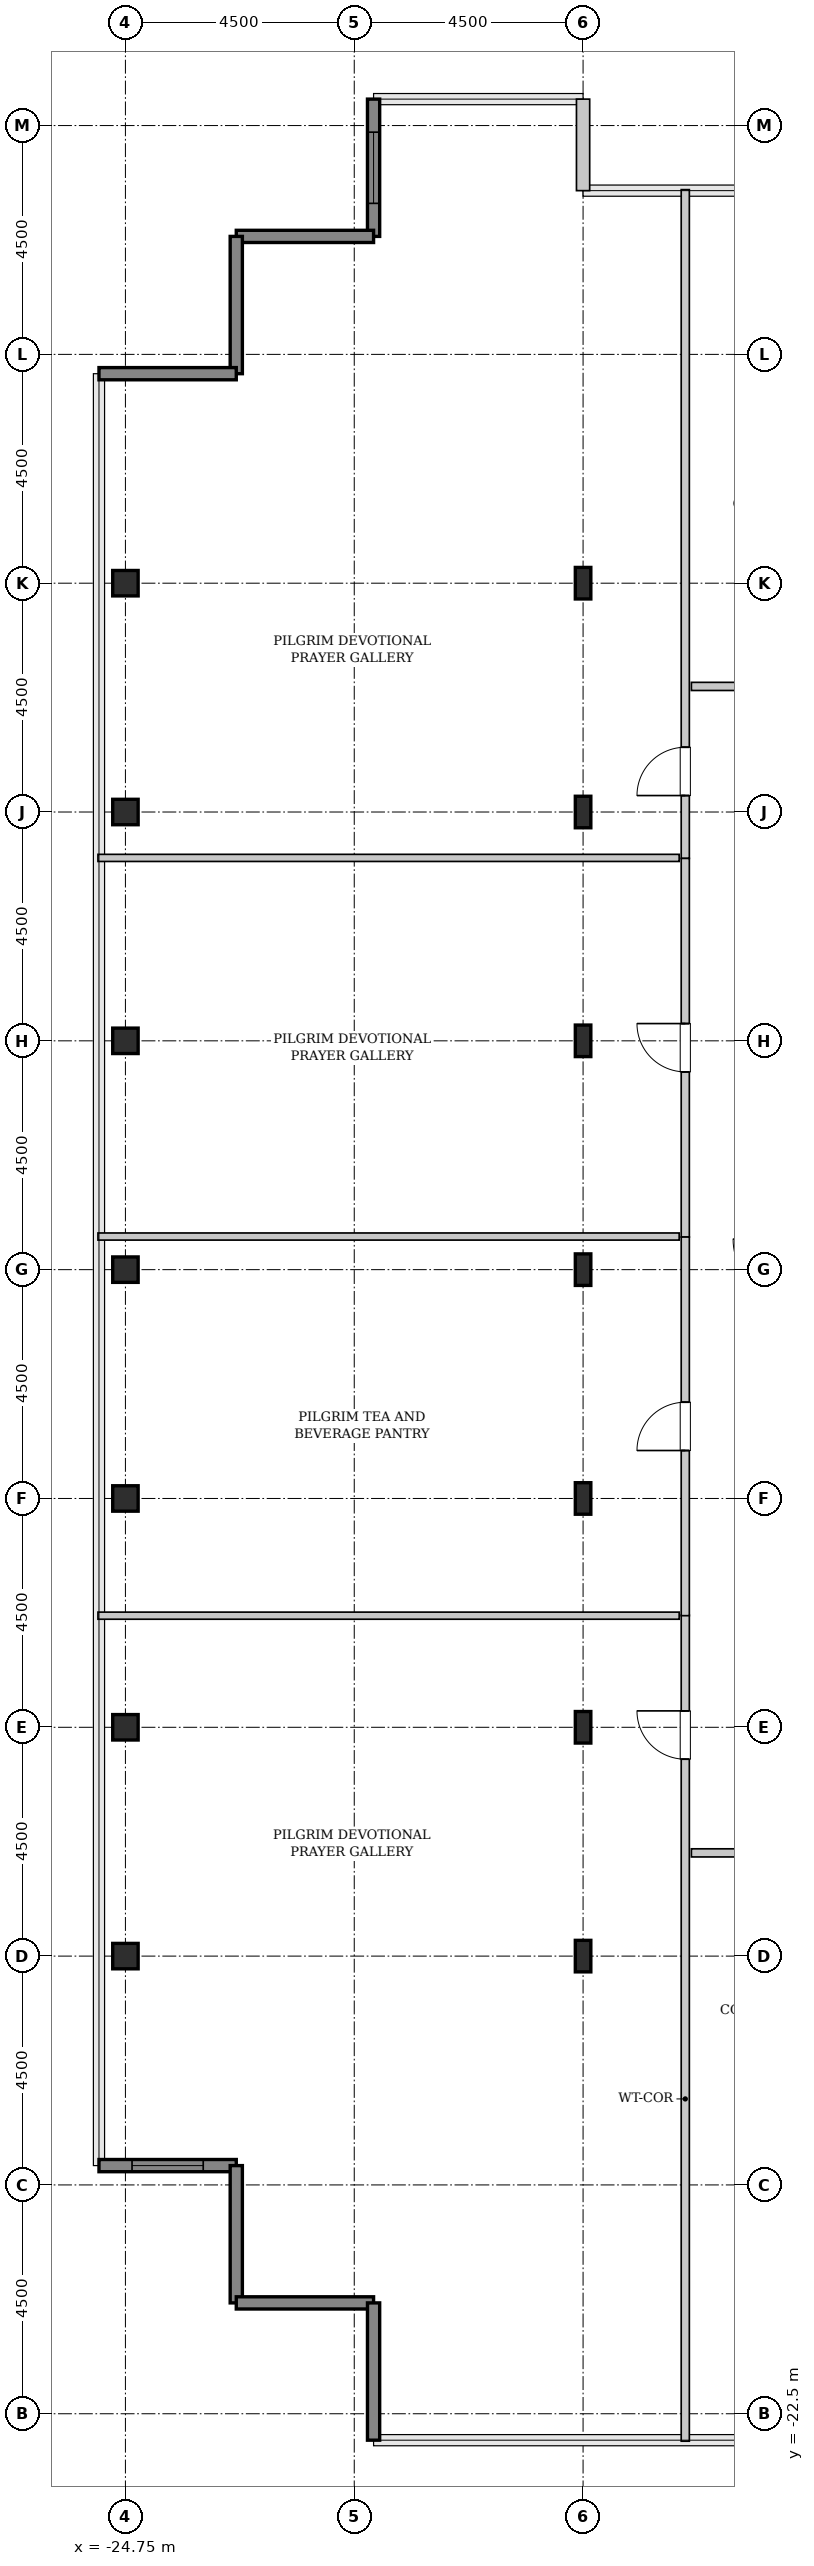
"""IFC4 building model, lengths in metres.
Left out: names, types, materials, properties, quantities, classifications, styles, units other than length and angle.
Written with IfcOpenShell. Run it as: python <this file> out.ifc"""

import sys

from ifc_helpers import new_model, si_unit, direction, frame, frame_2d, origin, origin_2d, place, context, subcontext, project, spatial, rectangle, hollow_rectangle, i_section, extrude, source, transform, mapped, element, fill, save


model = new_model("IFC4")
c1 = context("Model", 3, precision=1e-05, world=origin(), true_north=direction((0.0, 1.0)))
c2 = subcontext(c1, "Body", "Model", "MODEL_VIEW")
j1 = project(units=[si_unit("LENGTHUNIT", "METRE"), si_unit("PLANEANGLEUNIT", "RADIAN")], contexts=[c1])
p1 = place(None, origin())
s1 = spatial("IfcSite", under=j1, at=p1, CompositionType="ELEMENT")
p2 = place(p1, origin())
s2 = spatial("IfcBuilding", under=s1, at=p2, CompositionType="ELEMENT")
p3 = place(p2, frame((0.0, 0.0, 314.0)))
s3 = spatial("IfcBuildingStorey", under=s2, at=p3, CompositionType="ELEMENT", Elevation=314.0)
m1 = source(origin(), c2, "Body", "SweptSolid", [
    extrude(hollow_rectangle(XDim=0.5, YDim=0.5, WallThickness=0.025, InnerFilletRadius=0.025, OuterFilletRadius=0.05, at=origin_2d()), origin(), (0.0, 0.0, 1.0), 3.8),
])
for number, where, z_axis, x_axis in (
    (1, (-24.75, -13.5, 0.0), (0.0, 0.0, 1.0), (1.0, 0.0, 0.0)),
    (2, (-24.75, -9.0, 0.0), (0.0, 0.0, 1.0), (1.0, 0.0, 0.0)),
    (3, (-24.75, -4.5, 0.0), (0.0, 0.0, 1.0), (1.0, 0.0, 0.0)),
    (4, (-24.75, 0.0, 0.0), (0.0, 0.0, 1.0), (1.0, 0.0, 0.0)),
    (5, (-24.75, 4.5, 0.0), (0.0, 0.0, 1.0), (1.0, 0.0, 0.0)),
    (6, (-24.75, 9.0, 0.0), (0.0, 0.0, 1.0), (1.0, 0.0, 0.0)),
    (7, (-24.75, 13.5, 0.0), (0.0, 0.0, 1.0), (1.0, 0.0, 0.0)),
):
    element("IfcColumn", number, at=place(p3, frame(where, z_axis=z_axis, x_axis=x_axis)), inside=s3, PredefinedType="COLUMN", context=c2, shape_type="MappedRepresentation", body=[
        mapped(m1, transform((0.0, 0.0, 0.0), x_axis=(1.0, 0.0, 0.0), y_axis=(0.0, 1.0, 0.0), z_axis=(0.0, 0.0, 1.0), scale=1.0)),
    ])
m2 = source(origin(), c2, "Body", "SweptSolid", [
    extrude(i_section(OverallWidth=0.305, OverallDepth=0.62, WebThickness=0.021, FlangeThickness=0.04, FilletRadius=0.027, at=origin_2d()), origin(), (0.0, 0.0, 1.0), 3.8),
])
for number, where, z_axis, x_axis in (
    (8, (-15.75, -13.5, 0.0), (0.0, 0.0, 1.0), (1.0, 0.0, 0.0)),
    (9, (-15.75, -9.0, 0.0), (0.0, 0.0, 1.0), (1.0, 0.0, 0.0)),
    (10, (-15.75, -4.5, 0.0), (0.0, 0.0, 1.0), (1.0, 0.0, 0.0)),
    (11, (-15.75, 0.0, 0.0), (0.0, 0.0, 1.0), (1.0, 0.0, 0.0)),
    (12, (-15.75, 4.5, 0.0), (0.0, 0.0, 1.0), (1.0, 0.0, 0.0)),
    (13, (-15.75, 9.0, 0.0), (0.0, 0.0, 1.0), (1.0, 0.0, 0.0)),
    (14, (-15.75, 13.5, 0.0), (0.0, 0.0, 1.0), (1.0, 0.0, 0.0)),
):
    element("IfcColumn", number, at=place(p3, frame(where, z_axis=z_axis, x_axis=x_axis)), inside=s3, PredefinedType="COLUMN", context=c2, shape_type="MappedRepresentation", body=[
        mapped(m2, transform((0.0, 0.0, 0.0), x_axis=(1.0, 0.0, 0.0), y_axis=(0.0, 1.0, 0.0), z_axis=(0.0, 0.0, 1.0), scale=1.0)),
    ])
m3 = source(origin(), c2, "Body", "SweptSolid", [
    extrude(rectangle(XDim=1.8, YDim=0.26, at=frame_2d((0.9, 0.0))), origin(), (0.0, 0.0, 1.0), 3.5),
])
p4 = place(p3, frame((-15.75, 21.22, 0.0), z_axis=(0.0, 0.0, 1.0), x_axis=(0.0, 1.0, 0.0)))
e15 = element("IfcWall", 15, at=p4, inside=s3, PredefinedType="SOLIDWALL", context=c2, shape_type="MappedRepresentation", body=[
    mapped(m3, transform((0.0, 0.0, 0.0), x_axis=(1.0, 0.0, 0.0), y_axis=(0.0, 1.0, 0.0), z_axis=(0.0, 0.0, 1.0), scale=1.0)),
])
m4 = source(origin(), c2, "Body", "SweptSolid", [
    extrude(rectangle(XDim=2.7, YDim=0.24, at=frame_2d((1.35, 0.0))), origin(), (0.0, 0.0, 1.0), 3.5),
])
p5 = place(p3, frame((-19.87, 23.02, 0.0), z_axis=(0.0, 0.0, 1.0), x_axis=(0.0, -1.0, 0.0)))
e16 = element("IfcWall", 16, at=p5, inside=s3, PredefinedType="SHEAR", context=c2, shape_type="MappedRepresentation", body=[
    mapped(m4, transform((0.0, 0.0, 0.0), x_axis=(1.0, 0.0, 0.0), y_axis=(0.0, 1.0, 0.0), z_axis=(0.0, 0.0, 1.0), scale=1.0)),
])
p6 = place(p5, frame((0.65, 0.0, 0.85)))
e17 = element("IfcOpeningElement", 17, at=p6, cuts=e16, PredefinedType="OPENING", context=c2, shape_type="SweptSolid", body=[
    extrude(rectangle(XDim=1.4, YDim=1.8, at=frame_2d((0.7, 0.9))), frame((0.0, 0.13, 0.0), z_axis=(0.0, -1.0, 0.0), x_axis=(1.0, 0.0, 0.0)), (0.0, 0.0, 1.0), 0.26),
])
for number, where, z_axis, x_axis in (
    (18, (-19.87, 20.32, 0.0), (0.0, 0.0, 1.0), (-1.0, 0.0, 0.0)),
    (19, (-22.57, 20.32, 0.0), (0.0, 0.0, 1.0), (0.0, -1.0, 0.0)),
    (20, (-22.57, 17.62, 0.0), (0.0, 0.0, 1.0), (-1.0, 0.0, 0.0)),
):
    element("IfcWall", number, at=place(p3, frame(where, z_axis=z_axis, x_axis=x_axis)), inside=s3, PredefinedType="SHEAR", context=c2, shape_type="MappedRepresentation", body=[
        mapped(m4, transform((0.0, 0.0, 0.0), x_axis=(1.0, 0.0, 0.0), y_axis=(0.0, 1.0, 0.0), z_axis=(0.0, 0.0, 1.0), scale=1.0)),
    ])
p7 = place(p3, frame((-25.27, -17.62, 0.0), z_axis=(0.0, 0.0, 1.0), x_axis=(1.0, 0.0, 0.0)))
e21 = element("IfcWall", 21, at=p7, inside=s3, PredefinedType="SHEAR", context=c2, shape_type="MappedRepresentation", body=[
    mapped(m4, transform((0.0, 0.0, 0.0), x_axis=(1.0, 0.0, 0.0), y_axis=(0.0, 1.0, 0.0), z_axis=(0.0, 0.0, 1.0), scale=1.0)),
])
p8 = place(p7, frame((0.65, 0.0, 0.85)))
e22 = element("IfcOpeningElement", 22, at=p8, cuts=e21, PredefinedType="OPENING", context=c2, shape_type="SweptSolid", body=[
    extrude(rectangle(XDim=1.4, YDim=1.8, at=frame_2d((0.7, 0.9))), frame((0.0, 0.13, 0.0), z_axis=(0.0, -1.0, 0.0), x_axis=(1.0, 0.0, 0.0)), (0.0, 0.0, 1.0), 0.26),
])
for number, where, z_axis, x_axis in (
    (23, (-22.57, -17.62, 0.0), (0.0, 0.0, 1.0), (0.0, -1.0, 0.0)),
    (24, (-22.57, -20.32, 0.0), (0.0, 0.0, 1.0), (1.0, 0.0, 0.0)),
    (25, (-19.87, -20.32, 0.0), (0.0, 0.0, 1.0), (0.0, -1.0, 0.0)),
):
    element("IfcWall", number, at=place(p3, frame(where, z_axis=z_axis, x_axis=x_axis)), inside=s3, PredefinedType="SHEAR", context=c2, shape_type="MappedRepresentation", body=[
        mapped(m4, transform((0.0, 0.0, 0.0), x_axis=(1.0, 0.0, 0.0), y_axis=(0.0, 1.0, 0.0), z_axis=(0.0, 0.0, 1.0), scale=1.0)),
    ])
m5 = source(origin(), c2, "Body", "SweptSolid", [
    extrude(rectangle(XDim=16.245, YDim=0.16, at=frame_2d((8.123, 0.0))), origin(), (0.0, 0.0, 1.0), 3.485),
])
p9 = place(p3, frame((-13.74, -23.04, 0.0), z_axis=(0.0, 0.0, 1.0), x_axis=(0.0, 1.0, 0.0)))
e26 = element("IfcWall", 26, at=p9, inside=s3, PredefinedType="PARTITIONING", context=c2, shape_type="MappedRepresentation", body=[
    mapped(m5, transform((0.0, 0.0, 0.0), x_axis=(1.0, 0.0, 0.0), y_axis=(0.0, 1.0, 0.0), z_axis=(0.0, 0.0, 1.0), scale=1.0)),
])
p10 = place(p9, frame((13.413, 0.0, 0.0)))
e27 = element("IfcOpeningElement", 27, at=p10, cuts=e26, PredefinedType="OPENING", context=c2, shape_type="SweptSolid", body=[
    extrude(rectangle(XDim=0.95, YDim=2.1, at=frame_2d((0.475, 1.05))), frame((0.0, 0.09, 0.0), z_axis=(0.0, -1.0, 0.0), x_axis=(1.0, 0.0, 0.0)), (0.0, 0.0, 1.0), 0.18),
])
m6 = source(origin(), c2, "Body", "SweptSolid", [
    extrude(rectangle(XDim=11.43, YDim=0.14, at=frame_2d((5.715, 0.0))), origin(), (0.0, 0.0, 1.0), 3.485),
])
p11 = place(p3, frame((-25.29, -6.805, 0.0), z_axis=(0.0, 0.0, 1.0), x_axis=(1.0, 0.0, 0.0)))
e28 = element("IfcWall", 28, at=p11, inside=s3, PredefinedType="PARTITIONING", context=c2, shape_type="MappedRepresentation", body=[
    mapped(m6, transform((0.0, 0.0, 0.0), x_axis=(1.0, 0.0, 0.0), y_axis=(0.0, 1.0, 0.0), z_axis=(0.0, 0.0, 1.0), scale=1.0)),
])
m7 = source(origin(), c2, "Body", "SweptSolid", [
    extrude(rectangle(XDim=13.153, YDim=0.16, at=frame_2d((6.576, 0.0))), origin(), (0.0, 0.0, 1.0), 3.485),
])
p12 = place(p3, frame((-13.74, 8.087, 0.0), z_axis=(0.0, 0.0, 1.0), x_axis=(0.0, 1.0, 0.0)))
e29 = element("IfcWall", 29, at=p12, inside=s3, PredefinedType="PARTITIONING", context=c2, shape_type="MappedRepresentation", body=[
    mapped(m7, transform((0.0, 0.0, 0.0), x_axis=(1.0, 0.0, 0.0), y_axis=(0.0, 1.0, 0.0), z_axis=(0.0, 0.0, 1.0), scale=1.0)),
])
p13 = place(p12, frame((1.236, 0.0, 0.0)))
e30 = element("IfcOpeningElement", 30, at=p13, cuts=e29, PredefinedType="OPENING", context=c2, shape_type="SweptSolid", body=[
    extrude(rectangle(XDim=0.95, YDim=2.1, at=frame_2d((0.475, 1.05))), frame((0.0, 0.09, 0.0), z_axis=(0.0, -1.0, 0.0), x_axis=(1.0, 0.0, 0.0)), (0.0, 0.0, 1.0), 0.18),
])
p14 = place(p3, frame((-25.29, 8.097, 0.0), z_axis=(0.0, 0.0, 1.0), x_axis=(1.0, 0.0, 0.0)))
e31 = element("IfcWall", 31, at=p14, inside=s3, PredefinedType="PARTITIONING", context=c2, shape_type="MappedRepresentation", body=[
    mapped(m6, transform((0.0, 0.0, 0.0), x_axis=(1.0, 0.0, 0.0), y_axis=(0.0, 1.0, 0.0), z_axis=(0.0, 0.0, 1.0), scale=1.0)),
])
m8 = source(origin(), c2, "Body", "SweptSolid", [
    extrude(rectangle(XDim=7.446, YDim=0.16, at=frame_2d((3.723, 0.0))), origin(), (0.0, 0.0, 1.0), 3.485),
])
p15 = place(p3, frame((-13.74, 0.641, 0.0), z_axis=(0.0, 0.0, 1.0), x_axis=(0.0, 1.0, 0.0)))
e32 = element("IfcWall", 32, at=p15, inside=s3, PredefinedType="PARTITIONING", context=c2, shape_type="MappedRepresentation", body=[
    mapped(m8, transform((0.0, 0.0, 0.0), x_axis=(1.0, 0.0, 0.0), y_axis=(0.0, 1.0, 0.0), z_axis=(0.0, 0.0, 1.0), scale=1.0)),
])
p16 = place(p15, frame((3.248, 0.0, 0.0)))
e33 = element("IfcOpeningElement", 33, at=p16, cuts=e32, PredefinedType="OPENING", context=c2, shape_type="SweptSolid", body=[
    extrude(rectangle(XDim=0.95, YDim=2.1, at=frame_2d((0.475, 1.05))), frame((0.0, 0.09, 0.0), z_axis=(0.0, -1.0, 0.0), x_axis=(1.0, 0.0, 0.0)), (0.0, 0.0, 1.0), 0.18),
])
p17 = place(p3, frame((-25.29, 0.651, 0.0), z_axis=(0.0, 0.0, 1.0), x_axis=(1.0, 0.0, 0.0)))
e34 = element("IfcWall", 34, at=p17, inside=s3, PredefinedType="PARTITIONING", context=c2, shape_type="MappedRepresentation", body=[
    mapped(m6, transform((0.0, 0.0, 0.0), x_axis=(1.0, 0.0, 0.0), y_axis=(0.0, 1.0, 0.0), z_axis=(0.0, 0.0, 1.0), scale=1.0)),
])
m9 = source(origin(), c2, "Body", "SweptSolid", [
    extrude(rectangle(XDim=7.446, YDim=0.16, at=frame_2d((3.723, 0.0))), origin(), (0.0, 0.0, 1.0), 3.485),
])
p18 = place(p3, frame((-13.74, -6.805, 0.0), z_axis=(0.0, 0.0, 1.0), x_axis=(0.0, 1.0, 0.0)))
e35 = element("IfcWall", 35, at=p18, inside=s3, PredefinedType="PARTITIONING", context=c2, shape_type="MappedRepresentation", body=[
    mapped(m9, transform((0.0, 0.0, 0.0), x_axis=(1.0, 0.0, 0.0), y_axis=(0.0, 1.0, 0.0), z_axis=(0.0, 0.0, 1.0), scale=1.0)),
])
p19 = place(p18, frame((3.248, 0.0, 0.0)))
e36 = element("IfcOpeningElement", 36, at=p19, cuts=e35, PredefinedType="OPENING", context=c2, shape_type="SweptSolid", body=[
    extrude(rectangle(XDim=0.95, YDim=2.1, at=frame_2d((0.475, 1.05))), frame((0.0, 0.09, 0.0), z_axis=(0.0, -1.0, 0.0), x_axis=(1.0, 0.0, 0.0)), (0.0, 0.0, 1.0), 0.18),
])
m10 = source(origin(), c2, "Body", "SweptSolid", [
    extrude(rectangle(XDim=4.125, YDim=0.16, at=frame_2d((2.062, 0.0))), origin(), (0.0, 0.0, 1.0), 3.485),
])
p20 = place(p3, frame((-13.62, 11.47, 0.0), z_axis=(0.0, 0.0, 1.0), x_axis=(1.0, 0.0, 0.0)))
e37 = element("IfcWall", 37, at=p20, inside=s3, PredefinedType="PARTITIONING", context=c2, shape_type="MappedRepresentation", body=[
    mapped(m10, transform((0.0, 0.0, 0.0), x_axis=(1.0, 0.0, 0.0), y_axis=(0.0, 1.0, 0.0), z_axis=(0.0, 0.0, 1.0), scale=1.0)),
])
p21 = place(p20, frame((1.587, 0.0, 0.0)))
e38 = element("IfcOpeningElement", 38, at=p21, cuts=e37, PredefinedType="OPENING", context=c2, shape_type="SweptSolid", body=[
    extrude(rectangle(XDim=0.95, YDim=2.1, at=frame_2d((0.475, 1.05))), frame((0.0, 0.09, 0.0), z_axis=(0.0, -1.0, 0.0), x_axis=(1.0, 0.0, 0.0)), (0.0, 0.0, 1.0), 0.18),
])
m11 = source(origin(), c2, "Body", "SweptSolid", [
    extrude(rectangle(XDim=3.625, YDim=0.16, at=frame_2d((1.812, 0.0))), origin(), (0.0, 0.0, 1.0), 3.485),
])
p22 = place(p3, frame((-13.62, -11.47, 0.0), z_axis=(0.0, 0.0, 1.0), x_axis=(1.0, 0.0, 0.0)))
e39 = element("IfcWall", 39, at=p22, inside=s3, PredefinedType="PARTITIONING", context=c2, shape_type="MappedRepresentation", body=[
    mapped(m11, transform((0.0, 0.0, 0.0), x_axis=(1.0, 0.0, 0.0), y_axis=(0.0, 1.0, 0.0), z_axis=(0.0, 0.0, 1.0), scale=1.0)),
])
p23 = place(p22, frame((1.337, 0.0, 0.0)))
e40 = element("IfcOpeningElement", 40, at=p23, cuts=e39, PredefinedType="OPENING", context=c2, shape_type="SweptSolid", body=[
    extrude(rectangle(XDim=0.95, YDim=2.1, at=frame_2d((0.475, 1.05))), frame((0.0, 0.09, 0.0), z_axis=(0.0, -1.0, 0.0), x_axis=(1.0, 0.0, 0.0)), (0.0, 0.0, 1.0), 0.18),
])
m12 = source(origin(), c2, "Body", "SweptSolid", [
    extrude(rectangle(XDim=1.4, YDim=1.8, at=frame_2d((0.7, 0.9))), frame((0.0, 0.03, 0.0), z_axis=(0.0, -1.0, 0.0), x_axis=(1.0, 0.0, 0.0)), (0.0, 0.0, 1.0), 0.06),
])
p24 = place(p6, origin())
e41 = element("IfcWindow", 41, at=p24, inside=s3, PartitioningType="SINGLE_PANEL", PredefinedType="WINDOW", context=c2, shape_type="MappedRepresentation", body=[
    mapped(m12, transform((0.0, 0.0, 0.0), x_axis=(1.0, 0.0, 0.0), y_axis=(0.0, 1.0, 0.0), z_axis=(0.0, 0.0, 1.0), scale=1.0)),
])
fill(e17, e41)
p25 = place(p8, origin())
e42 = element("IfcWindow", 42, at=p25, inside=s3, PartitioningType="SINGLE_PANEL", PredefinedType="WINDOW", context=c2, shape_type="MappedRepresentation", body=[
    mapped(m12, transform((0.0, 0.0, 0.0), x_axis=(1.0, 0.0, 0.0), y_axis=(0.0, 1.0, 0.0), z_axis=(0.0, 0.0, 1.0), scale=1.0)),
])
fill(e22, e42)
m13 = source(origin(), c2, "Body", "SweptSolid", [
    extrude(rectangle(XDim=0.95, YDim=2.1, at=frame_2d((0.475, 1.05))), frame((0.0, 0.025, 0.0), z_axis=(0.0, -1.0, 0.0), x_axis=(1.0, 0.0, 0.0)), (0.0, 0.0, 1.0), 0.05),
])
p26 = place(p10, origin())
e43 = element("IfcDoor", 43, at=p26, inside=s3, OperationType="SINGLE_SWING_RIGHT", PredefinedType="DOOR", context=c2, shape_type="MappedRepresentation", body=[
    mapped(m13, transform((0.0, 0.0, 0.0), x_axis=(1.0, 0.0, 0.0), y_axis=(0.0, 1.0, 0.0), z_axis=(0.0, 0.0, 1.0), scale=1.0)),
])
fill(e27, e43)
p27 = place(p13, origin())
e44 = element("IfcDoor", 44, at=p27, inside=s3, OperationType="SINGLE_SWING_LEFT", PredefinedType="DOOR", context=c2, shape_type="MappedRepresentation", body=[
    mapped(m13, transform((0.0, 0.0, 0.0), x_axis=(1.0, 0.0, 0.0), y_axis=(0.0, 1.0, 0.0), z_axis=(0.0, 0.0, 1.0), scale=1.0)),
])
fill(e30, e44)
p28 = place(p16, origin())
e45 = element("IfcDoor", 45, at=p28, inside=s3, OperationType="SINGLE_SWING_RIGHT", PredefinedType="DOOR", context=c2, shape_type="MappedRepresentation", body=[
    mapped(m13, transform((0.0, 0.0, 0.0), x_axis=(1.0, 0.0, 0.0), y_axis=(0.0, 1.0, 0.0), z_axis=(0.0, 0.0, 1.0), scale=1.0)),
])
fill(e33, e45)
p29 = place(p19, origin())
e46 = element("IfcDoor", 46, at=p29, inside=s3, OperationType="SINGLE_SWING_LEFT", PredefinedType="DOOR", context=c2, shape_type="MappedRepresentation", body=[
    mapped(m13, transform((0.0, 0.0, 0.0), x_axis=(1.0, 0.0, 0.0), y_axis=(0.0, 1.0, 0.0), z_axis=(0.0, 0.0, 1.0), scale=1.0)),
])
fill(e36, e46)
save(model, sys.argv[1])
